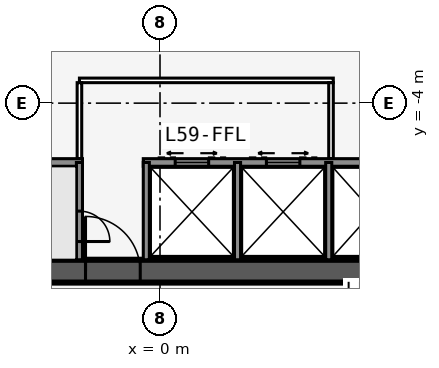
"""IFC4 building model, lengths in metres.
Left out: names, types, materials, properties, quantities, classifications, styles, units other than length and angle.
Written with IfcOpenShell. Run it as: python <this file> out.ifc"""

import sys

from ifc_helpers import new_model, si_unit, direction, frame, frame_2d, origin, place, context, subcontext, project, spatial, rectangle, extrude, element, fill, save


model = new_model("IFC4")
c1 = context("Model", 3, precision=1e-05, world=origin(), true_north=direction((0.0, 1.0)))
c2 = subcontext(c1, "Body", "Model", "MODEL_VIEW")
j1 = project(units=[si_unit("LENGTHUNIT", "METRE"), si_unit("PLANEANGLEUNIT", "RADIAN")], contexts=[c1])
p1 = place(None, origin())
s1 = spatial("IfcSite", under=j1, at=p1, CompositionType="ELEMENT")
p2 = place(p1, origin())
s2 = spatial("IfcBuilding", under=s1, at=p2, CompositionType="ELEMENT")
p3 = place(p2, frame((0.0, 0.0, 222.5)))
s3 = spatial("IfcBuildingStorey", under=s2, at=p3, CompositionType="ELEMENT", Elevation=222.5)
p4 = place(p3, frame((-16.5, -9.526, 0.0), z_axis=(0.0, 0.0, 1.0), x_axis=(1.0, 0.0, 0.0)))
e1 = element("IfcWall", 1, at=p4, inside=s3, PredefinedType="SHEAR", context=c2, shape_type="SweptSolid", body=[
    extrude(rectangle(XDim=33.0, YDim=0.75, at=frame_2d((16.5, 0.0))), origin(), (0.0, 0.0, 1.0), 3.6),
])
p5 = place(p4, frame((14.05, 0.0, 0.0)))
e2 = element("IfcOpeningElement", 2, at=p5, cuts=e1, PredefinedType="OPENING", context=c2, shape_type="SweptSolid", body=[
    extrude(rectangle(XDim=1.8, YDim=2.13, at=frame_2d((0.9, 1.065))), frame((0.0, 0.385, 0.0), z_axis=(0.0, -1.0, 0.0), x_axis=(1.0, 0.0, 0.0)), (0.0, 0.0, 1.0), 0.77),
])
p6 = place(p3, frame((-10.183, -5.951, 0.0), z_axis=(0.0, 0.0, 1.0), x_axis=(1.0, 0.0, 0.0)))
e3 = element("IfcWall", 3, at=p6, inside=s3, PredefinedType="SOLIDWALL", context=c2, shape_type="SweptSolid", body=[
    extrude(rectangle(XDim=7.633, YDim=0.25, at=frame_2d((3.816, 0.0))), origin(), (0.0, 0.0, 1.0), 3.435),
])
p7 = place(p3, frame((-0.55, -5.951, 0.0), z_axis=(0.0, 0.0, 1.0), x_axis=(1.0, 0.0, 0.0)))
e4 = element("IfcWall", 4, at=p7, inside=s3, PredefinedType="SOLIDWALL", context=c2, shape_type="SweptSolid", body=[
    extrude(rectangle(XDim=10.733, YDim=0.25, at=frame_2d((5.366, 0.0))), origin(), (0.0, 0.0, 1.0), 3.435),
])
p8 = place(p7, frame((9.314, 0.0, 0.0)))
e5 = element("IfcOpeningElement", 5, at=p8, cuts=e4, PredefinedType="OPENING", context=c2, shape_type="SweptSolid", body=[
    extrude(rectangle(XDim=0.9, YDim=2.13, at=frame_2d((0.45, 1.065))), frame((0.0, 0.135, 0.0), z_axis=(0.0, -1.0, 0.0), x_axis=(1.0, 0.0, 0.0)), (0.0, 0.0, 1.0), 0.27),
])
p9 = place(p7, frame((1.05, 0.0, 0.0)))
e6 = element("IfcOpeningElement", 6, at=p9, cuts=e4, PredefinedType="OPENING", context=c2, shape_type="SweptSolid", body=[
    extrude(rectangle(XDim=1.1, YDim=2.13, at=frame_2d((0.55, 1.065))), frame((0.0, 0.135, 0.0), z_axis=(0.0, -1.0, 0.0), x_axis=(1.0, 0.0, 0.0)), (0.0, 0.0, 1.0), 0.27),
])
p10 = place(p7, frame((4.05, 0.0, 0.0)))
e7 = element("IfcOpeningElement", 7, at=p10, cuts=e4, PredefinedType="OPENING", context=c2, shape_type="SweptSolid", body=[
    extrude(rectangle(XDim=1.1, YDim=2.13, at=frame_2d((0.55, 1.065))), frame((0.0, 0.135, 0.0), z_axis=(0.0, -1.0, 0.0), x_axis=(1.0, 0.0, 0.0)), (0.0, 0.0, 1.0), 0.27),
])
p11 = place(p3, frame((-2.65, -5.951, 0.0), z_axis=(0.0, 0.0, 1.0), x_axis=(0.0, -1.0, 0.0)))
e8 = element("IfcWall", 8, at=p11, inside=s3, PredefinedType="SOLIDWALL", context=c2, shape_type="SweptSolid", body=[
    extrude(rectangle(XDim=3.2, YDim=0.2, at=frame_2d((1.6, 0.0))), origin(), (0.0, 0.0, 1.0), 3.435),
])
p12 = place(p11, frame((1.6, 0.0, 0.0)))
e9 = element("IfcOpeningElement", 9, at=p12, cuts=e8, PredefinedType="OPENING", context=c2, shape_type="SweptSolid", body=[
    extrude(rectangle(XDim=1.0, YDim=2.13, at=frame_2d((0.5, 1.065))), frame((0.0, 0.11, 0.0), z_axis=(0.0, -1.0, 0.0), x_axis=(1.0, 0.0, 0.0)), (0.0, 0.0, 1.0), 0.22),
])
for number, where, z_axis, x_axis in (
    (10, (-0.45, -5.951, 0.0), (0.0, 0.0, 1.0), (0.0, -1.0, 0.0)),
    (11, (2.55, -5.951, 0.0), (0.0, 0.0, 1.0), (0.0, -1.0, 0.0)),
    (12, (5.55, -5.951, 0.0), (0.0, 0.0, 1.0), (0.0, -1.0, 0.0)),
):
    element("IfcWall", number, at=place(p3, frame(where, z_axis=z_axis, x_axis=x_axis)), inside=s3, PredefinedType="SOLIDWALL", context=c2, shape_type="SweptSolid", body=[
        extrude(rectangle(XDim=3.2, YDim=0.2, at=frame_2d((1.6, 0.0))), origin(), (0.0, 0.0, 1.0), 3.435),
    ])
p13 = place(p3, frame((16.5, -9.526, 0.0), z_axis=(0.0, 0.0, 1.0), x_axis=(-0.499999749417, 0.866025548458, 0.0)))
e13 = element("IfcWall", 13, at=p13, inside=s3, PredefinedType="SHEAR", context=c2, shape_type="SweptSolid", body=[
    extrude(rectangle(XDim=33.0, YDim=0.75, at=frame_2d((16.5, 0.0))), origin(), (0.0, 0.0, 1.0), 3.6),
])
p14 = place(p13, frame((14.15, 0.0, 0.0)))
e14 = element("IfcOpeningElement", 14, at=p14, cuts=e13, PredefinedType="OPENING", context=c2, shape_type="SweptSolid", body=[
    extrude(rectangle(XDim=1.8, YDim=2.13, at=frame_2d((0.9, 1.065))), frame((0.0, 0.385, 0.0), z_axis=(0.0, -1.0, 0.0), x_axis=(1.0, 0.0, 0.0)), (0.0, 0.0, 1.0), 0.77),
])
p15 = place(p13, frame((12.6, 0.0, 0.0)))
e15 = element("IfcOpeningElement", 15, at=p15, cuts=e13, PredefinedType="OPENING", context=c2, shape_type="SweptSolid", body=[
    extrude(rectangle(XDim=1.0, YDim=2.13, at=frame_2d((0.5, 1.065))), frame((0.0, 0.385, 0.0), z_axis=(0.0, -1.0, 0.0), x_axis=(1.0, 0.0, 0.0)), (0.0, 0.0, 1.0), 0.77),
])
p16 = place(p3, frame((10.245, -5.843, 0.0), z_axis=(0.0, 0.0, 1.0), x_axis=(-0.499993009313, 0.866029439822, 0.0)))
e16 = element("IfcWall", 16, at=p16, inside=s3, PredefinedType="SOLIDWALL", context=c2, shape_type="SweptSolid", body=[
    extrude(rectangle(XDim=7.733, YDim=0.25, at=frame_2d((3.866, 0.0))), origin(), (0.0, 0.0, 1.0), 3.435),
])
p17 = place(p3, frame((0.0, 19.052, 0.0), z_axis=(0.0, 0.0, 1.0), x_axis=(-0.499999749417, -0.866025548458, 0.0)))
e17 = element("IfcWall", 17, at=p17, inside=s3, PredefinedType="SHEAR", context=c2, shape_type="SweptSolid", body=[
    extrude(rectangle(XDim=33.0, YDim=0.75, at=frame_2d((16.5, 0.0))), origin(), (0.0, 0.0, 1.0), 3.6),
])
p18 = place(p17, frame((14.15, 0.0, 0.0)))
e18 = element("IfcOpeningElement", 18, at=p18, cuts=e17, PredefinedType="OPENING", context=c2, shape_type="SweptSolid", body=[
    extrude(rectangle(XDim=1.8, YDim=2.13, at=frame_2d((0.9, 1.065))), frame((0.0, 0.385, 0.0), z_axis=(0.0, -1.0, 0.0), x_axis=(1.0, 0.0, 0.0)), (0.0, 0.0, 1.0), 0.77),
])
p19 = place(p17, frame((12.6, 0.0, 0.0)))
e19 = element("IfcOpeningElement", 19, at=p19, cuts=e17, PredefinedType="OPENING", context=c2, shape_type="SweptSolid", body=[
    extrude(rectangle(XDim=1.0, YDim=2.13, at=frame_2d((0.5, 1.065))), frame((0.0, 0.385, 0.0), z_axis=(0.0, -1.0, 0.0), x_axis=(1.0, 0.0, 0.0)), (0.0, 0.0, 1.0), 0.77),
])
p20 = place(p3, frame((20.102, -11.115, 0.0), z_axis=(0.0, 0.0, 1.0), x_axis=(-0.500000265775, 0.866025250339, 0.0)))
e20 = element("IfcWall", 20, at=p20, inside=s3, PredefinedType="PARTITIONING", context=c2, shape_type="SweptSolid", body=[
    extrude(rectangle(XDim=39.354, YDim=0.15, at=frame_2d((19.677, 0.0))), origin(), (0.0, 0.0, 1.0), 3.435),
])
p21 = place(p20, frame((1.102, 0.0, 0.0)))
e21 = element("IfcOpeningElement", 21, at=p21, cuts=e20, PredefinedType="OPENING", context=c2, shape_type="SweptSolid", body=[
    extrude(rectangle(XDim=0.95, YDim=2.13, at=frame_2d((0.475, 1.065))), frame((0.0, 0.085, 0.0), z_axis=(0.0, -1.0, 0.0), x_axis=(1.0, 0.0, 0.0)), (0.0, 0.0, 1.0), 0.17),
])
p22 = place(p20, frame((11.702, 0.0, 0.0)))
e22 = element("IfcOpeningElement", 22, at=p22, cuts=e20, PredefinedType="OPENING", context=c2, shape_type="SweptSolid", body=[
    extrude(rectangle(XDim=0.95, YDim=2.13, at=frame_2d((0.475, 1.065))), frame((0.0, 0.085, 0.0), z_axis=(0.0, -1.0, 0.0), x_axis=(1.0, 0.0, 0.0)), (0.0, 0.0, 1.0), 0.17),
])
p23 = place(p20, frame((26.702, 0.0, 0.0)))
e23 = element("IfcOpeningElement", 23, at=p23, cuts=e20, PredefinedType="OPENING", context=c2, shape_type="SweptSolid", body=[
    extrude(rectangle(XDim=0.95, YDim=2.13, at=frame_2d((0.475, 1.065))), frame((0.0, 0.085, 0.0), z_axis=(0.0, -1.0, 0.0), x_axis=(1.0, 0.0, 0.0)), (0.0, 0.0, 1.0), 0.17),
])
p24 = place(p20, frame((37.302, 0.0, 0.0)))
e24 = element("IfcOpeningElement", 24, at=p24, cuts=e20, PredefinedType="OPENING", context=c2, shape_type="SweptSolid", body=[
    extrude(rectangle(XDim=0.95, YDim=2.13, at=frame_2d((0.475, 1.065))), frame((0.0, 0.085, 0.0), z_axis=(0.0, -1.0, 0.0), x_axis=(1.0, 0.0, 0.0)), (0.0, 0.0, 1.0), 0.17),
])
p25 = place(p3, frame((-0.425, 22.966, 0.0), z_axis=(0.0, 0.0, 1.0), x_axis=(-0.500000265775, -0.866025250339, 0.0)))
e25 = element("IfcWall", 25, at=p25, inside=s3, PredefinedType="PARTITIONING", context=c2, shape_type="SweptSolid", body=[
    extrude(rectangle(XDim=39.354, YDim=0.15, at=frame_2d((19.677, 0.0))), origin(), (0.0, 0.0, 1.0), 3.435),
])
p26 = place(p25, frame((1.665, 0.0, 0.0)))
e26 = element("IfcOpeningElement", 26, at=p26, cuts=e25, PredefinedType="OPENING", context=c2, shape_type="SweptSolid", body=[
    extrude(rectangle(XDim=0.95, YDim=2.13, at=frame_2d((0.475, 1.065))), frame((0.0, 0.085, 0.0), z_axis=(0.0, -1.0, 0.0), x_axis=(1.0, 0.0, 0.0)), (0.0, 0.0, 1.0), 0.17),
])
p27 = place(p25, frame((11.702, 0.0, 0.0)))
e27 = element("IfcOpeningElement", 27, at=p27, cuts=e25, PredefinedType="OPENING", context=c2, shape_type="SweptSolid", body=[
    extrude(rectangle(XDim=0.95, YDim=2.13, at=frame_2d((0.475, 1.065))), frame((0.0, 0.085, 0.0), z_axis=(0.0, -1.0, 0.0), x_axis=(1.0, 0.0, 0.0)), (0.0, 0.0, 1.0), 0.17),
])
p28 = place(p25, frame((21.702, 0.0, 0.0)))
e28 = element("IfcOpeningElement", 28, at=p28, cuts=e25, PredefinedType="OPENING", context=c2, shape_type="SweptSolid", body=[
    extrude(rectangle(XDim=0.95, YDim=2.13, at=frame_2d((0.475, 1.065))), frame((0.0, 0.085, 0.0), z_axis=(0.0, -1.0, 0.0), x_axis=(1.0, 0.0, 0.0)), (0.0, 0.0, 1.0), 0.17),
])
p29 = place(p25, frame((36.739, 0.0, 0.0)))
e29 = element("IfcOpeningElement", 29, at=p29, cuts=e25, PredefinedType="OPENING", context=c2, shape_type="SweptSolid", body=[
    extrude(rectangle(XDim=0.95, YDim=2.13, at=frame_2d((0.475, 1.065))), frame((0.0, 0.085, 0.0), z_axis=(0.0, -1.0, 0.0), x_axis=(1.0, 0.0, 0.0)), (0.0, 0.0, 1.0), 0.17),
])
p30 = place(p3, frame((-2.65, -3.251, 0.0), z_axis=(0.0, 0.0, 1.0), x_axis=(1.0, 0.0, 0.0)))
e30 = element("IfcWall", 30, at=p30, inside=s3, PredefinedType="PARTITIONING", context=c2, shape_type="SweptSolid", body=[
    extrude(rectangle(XDim=8.35, YDim=0.15, at=frame_2d((4.175, 0.0))), origin(), (0.0, 0.0, 1.0), 3.435),
])
for number, where, z_axis, x_axis in (
    (31, (-2.65, -5.826, 0.0), (0.0, 0.0, 1.0), (0.0, 1.0, 0.0)),
    (32, (5.625, -5.826, 0.0), (0.0, 0.0, 1.0), (0.0, 1.0, 0.0)),
):
    element("IfcWall", number, at=place(p3, frame(where, z_axis=z_axis, x_axis=x_axis)), inside=s3, PredefinedType="PARTITIONING", context=c2, shape_type="SweptSolid", body=[
        extrude(rectangle(XDim=2.5, YDim=0.15, at=frame_2d((1.25, 0.0))), origin(), (0.0, 0.0, 1.0), 3.435),
    ])
p31 = place(p5, origin())
e33 = element("IfcDoor", 33, at=p31, inside=s3, OperationType="DOUBLE_DOOR_SINGLE_SWING", PredefinedType="DOOR", context=c2, shape_type="SweptSolid", body=[
    extrude(rectangle(XDim=1.8, YDim=2.13, at=frame_2d((0.9, 1.065))), frame((0.0, 0.025, 0.0), z_axis=(0.0, -1.0, 0.0), x_axis=(1.0, 0.0, 0.0)), (0.0, 0.0, 1.0), 0.05),
])
fill(e2, e33)
p32 = place(p12, origin())
e34 = element("IfcDoor", 34, at=p32, inside=s3, OperationType="SINGLE_SWING_RIGHT", PredefinedType="DOOR", context=c2, shape_type="SweptSolid", body=[
    extrude(rectangle(XDim=1.0, YDim=2.13, at=frame_2d((0.5, 1.065))), frame((0.0, 0.025, 0.0), z_axis=(0.0, -1.0, 0.0), x_axis=(1.0, 0.0, 0.0)), (0.0, 0.0, 1.0), 0.05),
])
fill(e9, e34)
p33 = place(p9, origin())
e35 = element("IfcDoor", 35, at=p33, inside=s3, OperationType="DOUBLE_DOOR_SLIDING", PredefinedType="USERDEFINED", context=c2, shape_type="SweptSolid", body=[
    extrude(rectangle(XDim=1.1, YDim=2.13, at=frame_2d((0.55, 1.065))), frame((0.0, 0.025, 0.0), z_axis=(0.0, -1.0, 0.0), x_axis=(1.0, 0.0, 0.0)), (0.0, 0.0, 1.0), 0.05),
])
fill(e6, e35)
p34 = place(p10, origin())
e36 = element("IfcDoor", 36, at=p34, inside=s3, OperationType="DOUBLE_DOOR_SLIDING", PredefinedType="USERDEFINED", context=c2, shape_type="SweptSolid", body=[
    extrude(rectangle(XDim=1.1, YDim=2.13, at=frame_2d((0.55, 1.065))), frame((0.0, 0.025, 0.0), z_axis=(0.0, -1.0, 0.0), x_axis=(1.0, 0.0, 0.0)), (0.0, 0.0, 1.0), 0.05),
])
fill(e7, e36)
save(model, sys.argv[1])
